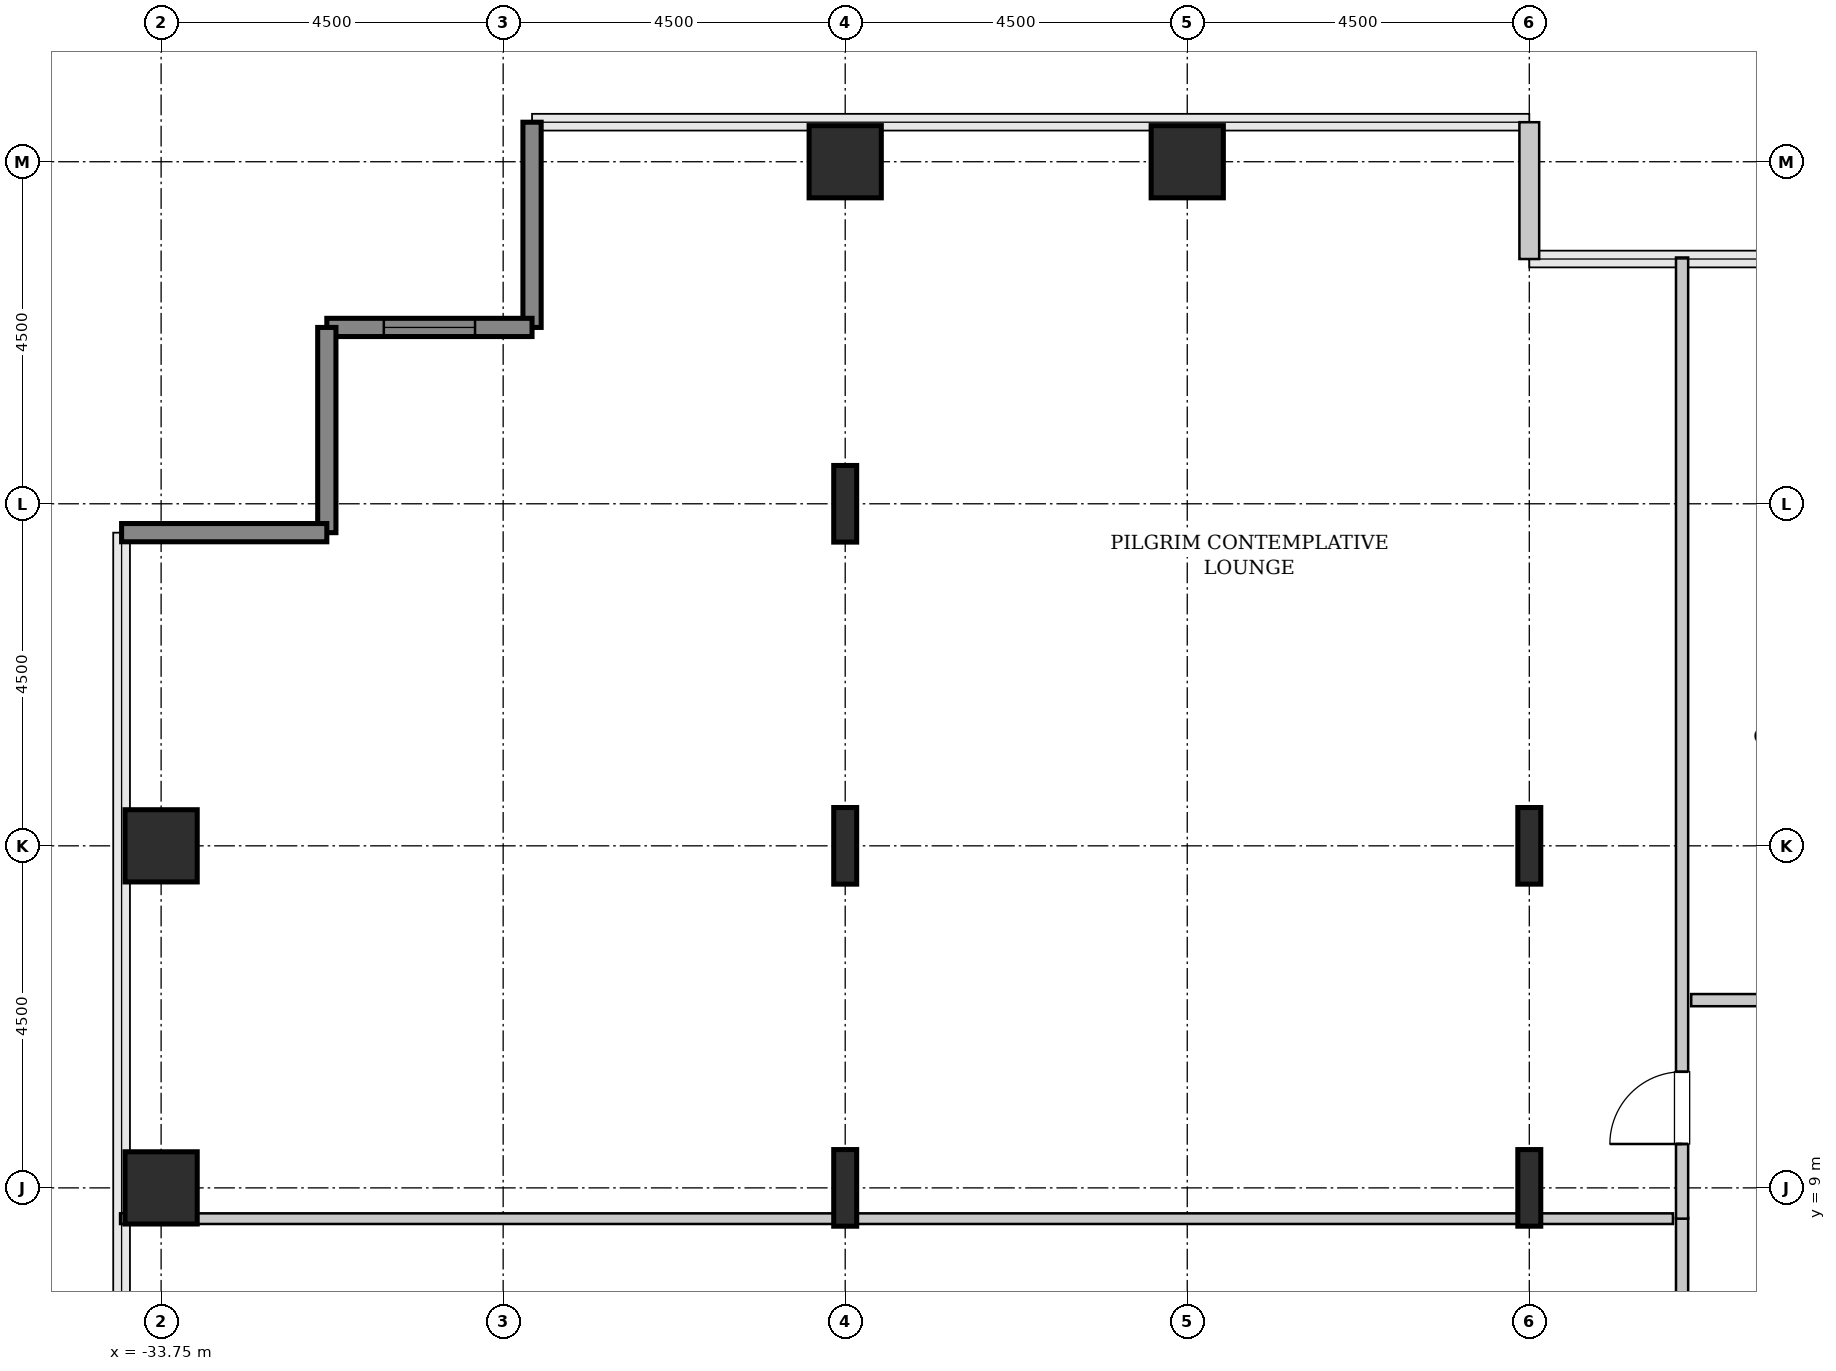
"""IFC4 building model, lengths in metres.
Left out: names, types, materials, properties, quantities, classifications, styles, units other than length and angle.
Written with IfcOpenShell. Run it as: python <this file> out.ifc"""

import sys

from ifc_helpers import new_model, si_unit, direction, frame, frame_2d, origin, origin_2d, place, context, subcontext, project, spatial, rectangle, hollow_rectangle, i_section, extrude, source, transform, mapped, element, fill, save


model = new_model("IFC4")
c1 = context("Model", 3, precision=1e-05, world=origin(), true_north=direction((0.0, 1.0)))
c2 = subcontext(c1, "Body", "Model", "MODEL_VIEW")
j1 = project(units=[si_unit("LENGTHUNIT", "METRE"), si_unit("PLANEANGLEUNIT", "RADIAN")], contexts=[c1])
p1 = place(None, origin())
s1 = spatial("IfcSite", under=j1, at=p1, CompositionType="ELEMENT")
p2 = place(p1, origin())
s2 = spatial("IfcBuilding", under=s1, at=p2, CompositionType="ELEMENT")
p3 = place(p2, frame((0.0, 0.0, 71.0)))
s3 = spatial("IfcBuildingStorey", under=s2, at=p3, CompositionType="ELEMENT", Elevation=71.0)
m1 = source(origin(), c2, "Body", "SweptSolid", [
    extrude(hollow_rectangle(XDim=0.95, YDim=0.95, WallThickness=0.045, InnerFilletRadius=0.045, OuterFilletRadius=0.09, at=origin_2d()), origin(), (0.0, 0.0, 1.0), 3.8),
])
for number, where, z_axis, x_axis in (
    (1, (-33.75, 9.0, 0.0), (0.0, 0.0, 1.0), (1.0, 0.0, 0.0)),
    (2, (-33.75, 13.5, 0.0), (0.0, 0.0, 1.0), (1.0, 0.0, 0.0)),
):
    element("IfcColumn", number, at=place(p3, frame(where, z_axis=z_axis, x_axis=x_axis)), inside=s3, PredefinedType="COLUMN", context=c2, shape_type="MappedRepresentation", body=[
        mapped(m1, transform((0.0, 0.0, 0.0), x_axis=(1.0, 0.0, 0.0), y_axis=(0.0, 1.0, 0.0), z_axis=(0.0, 0.0, 1.0), scale=1.0)),
    ])
m2 = source(origin(), c2, "Body", "SweptSolid", [
    extrude(i_section(OverallWidth=0.302, OverallDepth=1.008, WebThickness=0.021, FlangeThickness=0.04, FilletRadius=0.03, at=origin_2d()), origin(), (0.0, 0.0, 1.0), 3.8),
])
for number, where, z_axis, x_axis in (
    (3, (-24.75, 9.0, 0.0), (0.0, 0.0, 1.0), (1.0, 0.0, 0.0)),
    (4, (-24.75, 13.5, 0.0), (0.0, 0.0, 1.0), (1.0, 0.0, 0.0)),
    (5, (-24.75, 18.0, 0.0), (0.0, 0.0, 1.0), (1.0, 0.0, 0.0)),
):
    element("IfcColumn", number, at=place(p3, frame(where, z_axis=z_axis, x_axis=x_axis)), inside=s3, PredefinedType="COLUMN", context=c2, shape_type="MappedRepresentation", body=[
        mapped(m2, transform((0.0, 0.0, 0.0), x_axis=(1.0, 0.0, 0.0), y_axis=(0.0, 1.0, 0.0), z_axis=(0.0, 0.0, 1.0), scale=1.0)),
    ])
for number, where, z_axis, x_axis in (
    (6, (-24.75, 22.5, 0.0), (0.0, 0.0, 1.0), (1.0, 0.0, 0.0)),
    (7, (-20.25, 22.5, 0.0), (0.0, 0.0, 1.0), (1.0, 0.0, 0.0)),
):
    element("IfcColumn", number, at=place(p3, frame(where, z_axis=z_axis, x_axis=x_axis)), inside=s3, PredefinedType="COLUMN", context=c2, shape_type="MappedRepresentation", body=[
        mapped(m1, transform((0.0, 0.0, 0.0), x_axis=(1.0, 0.0, 0.0), y_axis=(0.0, 1.0, 0.0), z_axis=(0.0, 0.0, 1.0), scale=1.0)),
    ])
for number, where, z_axis, x_axis in (
    (8, (-15.75, 9.0, 0.0), (0.0, 0.0, 1.0), (1.0, 0.0, 0.0)),
    (9, (-15.75, 13.5, 0.0), (0.0, 0.0, 1.0), (1.0, 0.0, 0.0)),
):
    element("IfcColumn", number, at=place(p3, frame(where, z_axis=z_axis, x_axis=x_axis)), inside=s3, PredefinedType="COLUMN", context=c2, shape_type="MappedRepresentation", body=[
        mapped(m2, transform((0.0, 0.0, 0.0), x_axis=(1.0, 0.0, 0.0), y_axis=(0.0, 1.0, 0.0), z_axis=(0.0, 0.0, 1.0), scale=1.0)),
    ])
m3 = source(origin(), c2, "Body", "SweptSolid", [
    extrude(rectangle(XDim=1.8, YDim=0.26, at=frame_2d((0.9, 0.0))), origin(), (0.0, 0.0, 1.0), 3.55),
])
p4 = place(p3, frame((-15.75, 21.22, 0.0), z_axis=(0.0, 0.0, 1.0), x_axis=(0.0, 1.0, 0.0)))
e10 = element("IfcWall", 10, at=p4, inside=s3, PredefinedType="SOLIDWALL", context=c2, shape_type="MappedRepresentation", body=[
    mapped(m3, transform((0.0, 0.0, 0.0), x_axis=(1.0, 0.0, 0.0), y_axis=(0.0, 1.0, 0.0), z_axis=(0.0, 0.0, 1.0), scale=1.0)),
])
m4 = source(origin(), c2, "Body", "SweptSolid", [
    extrude(rectangle(XDim=2.7, YDim=0.24, at=frame_2d((1.35, 0.0))), origin(), (0.0, 0.0, 1.0), 3.55),
])
p5 = place(p3, frame((-28.87, 23.02, 0.0), z_axis=(0.0, 0.0, 1.0), x_axis=(0.0, -1.0, 0.0)))
e11 = element("IfcWall", 11, at=p5, inside=s3, PredefinedType="SHEAR", context=c2, shape_type="MappedRepresentation", body=[
    mapped(m4, transform((0.0, 0.0, 0.0), x_axis=(1.0, 0.0, 0.0), y_axis=(0.0, 1.0, 0.0), z_axis=(0.0, 0.0, 1.0), scale=1.0)),
])
p6 = place(p3, frame((-28.87, 20.32, 0.0), z_axis=(0.0, 0.0, 1.0), x_axis=(-1.0, 0.0, 0.0)))
e12 = element("IfcWall", 12, at=p6, inside=s3, PredefinedType="SHEAR", context=c2, shape_type="MappedRepresentation", body=[
    mapped(m4, transform((0.0, 0.0, 0.0), x_axis=(1.0, 0.0, 0.0), y_axis=(0.0, 1.0, 0.0), z_axis=(0.0, 0.0, 1.0), scale=1.0)),
])
p7 = place(p6, frame((0.75, 0.0, 0.85)))
e13 = element("IfcOpeningElement", 13, at=p7, cuts=e12, PredefinedType="OPENING", context=c2, shape_type="SweptSolid", body=[
    extrude(rectangle(XDim=1.2, YDim=1.8, at=frame_2d((0.6, 0.9))), frame((0.0, 0.13, 0.0), z_axis=(0.0, -1.0, 0.0), x_axis=(1.0, 0.0, 0.0)), (0.0, 0.0, 1.0), 0.26),
])
for number, where, z_axis, x_axis in (
    (14, (-31.57, 20.32, 0.0), (0.0, 0.0, 1.0), (0.0, -1.0, 0.0)),
    (15, (-31.57, 17.62, 0.0), (0.0, 0.0, 1.0), (-1.0, 0.0, 0.0)),
):
    element("IfcWall", number, at=place(p3, frame(where, z_axis=z_axis, x_axis=x_axis)), inside=s3, PredefinedType="SHEAR", context=c2, shape_type="MappedRepresentation", body=[
        mapped(m4, transform((0.0, 0.0, 0.0), x_axis=(1.0, 0.0, 0.0), y_axis=(0.0, 1.0, 0.0), z_axis=(0.0, 0.0, 1.0), scale=1.0)),
    ])
m5 = source(origin(), c2, "Body", "SweptSolid", [
    extrude(rectangle(XDim=3.21, YDim=0.16, at=frame_2d((1.605, 0.0))), origin(), (0.0, 0.0, 1.0), 3.535),
])
p8 = place(p3, frame((-13.74, 5.395, 0.0), z_axis=(0.0, 0.0, 1.0), x_axis=(0.0, 1.0, 0.0)))
e16 = element("IfcWall", 16, at=p8, inside=s3, PredefinedType="PARTITIONING", context=c2, shape_type="MappedRepresentation", body=[
    mapped(m5, transform((0.0, 0.0, 0.0), x_axis=(1.0, 0.0, 0.0), y_axis=(0.0, 1.0, 0.0), z_axis=(0.0, 0.0, 1.0), scale=1.0)),
])
p9 = place(p8, frame((1.13, 0.0, 0.0)))
e17 = element("IfcOpeningElement", 17, at=p9, cuts=e16, PredefinedType="OPENING", context=c2, shape_type="SweptSolid", body=[
    extrude(rectangle(XDim=0.95, YDim=2.1, at=frame_2d((0.475, 1.05))), frame((0.0, 0.09, 0.0), z_axis=(0.0, -1.0, 0.0), x_axis=(1.0, 0.0, 0.0)), (0.0, 0.0, 1.0), 0.18),
])
m6 = source(origin(), c2, "Body", "SweptSolid", [
    extrude(rectangle(XDim=20.43, YDim=0.14, at=frame_2d((10.215, 0.0))), origin(), (0.0, 0.0, 1.0), 2.825),
])
p10 = place(p3, frame((-34.29, 8.595, 0.0), z_axis=(0.0, 0.0, 1.0), x_axis=(1.0, 0.0, 0.0)))
e18 = element("IfcWall", 18, at=p10, inside=s3, PredefinedType="PARTITIONING", context=c2, shape_type="MappedRepresentation", body=[
    mapped(m6, transform((0.0, 0.0, 0.0), x_axis=(1.0, 0.0, 0.0), y_axis=(0.0, 1.0, 0.0), z_axis=(0.0, 0.0, 1.0), scale=1.0)),
])
m7 = source(origin(), c2, "Body", "SweptSolid", [
    extrude(rectangle(XDim=12.645, YDim=0.16, at=frame_2d((6.323, 0.0))), origin(), (0.0, 0.0, 1.0), 3.535),
])
p11 = place(p3, frame((-13.74, 8.595, 0.0), z_axis=(0.0, 0.0, 1.0), x_axis=(0.0, 1.0, 0.0)))
e19 = element("IfcWall", 19, at=p11, inside=s3, PredefinedType="PARTITIONING", context=c2, shape_type="MappedRepresentation", body=[
    mapped(m7, transform((0.0, 0.0, 0.0), x_axis=(1.0, 0.0, 0.0), y_axis=(0.0, 1.0, 0.0), z_axis=(0.0, 0.0, 1.0), scale=1.0)),
])
p12 = place(p11, frame((0.982, 0.0, 0.0)))
e20 = element("IfcOpeningElement", 20, at=p12, cuts=e19, PredefinedType="OPENING", context=c2, shape_type="SweptSolid", body=[
    extrude(rectangle(XDim=0.95, YDim=2.1, at=frame_2d((0.475, 1.05))), frame((0.0, 0.09, 0.0), z_axis=(0.0, -1.0, 0.0), x_axis=(1.0, 0.0, 0.0)), (0.0, 0.0, 1.0), 0.18),
])
m8 = source(origin(), c2, "Body", "SweptSolid", [
    extrude(rectangle(XDim=4.125, YDim=0.16, at=frame_2d((2.062, 0.0))), origin(), (0.0, 0.0, 1.0), 3.535),
])
p13 = place(p3, frame((-13.62, 11.47, 0.0), z_axis=(0.0, 0.0, 1.0), x_axis=(1.0, 0.0, 0.0)))
e21 = element("IfcWall", 21, at=p13, inside=s3, PredefinedType="PARTITIONING", context=c2, shape_type="MappedRepresentation", body=[
    mapped(m8, transform((0.0, 0.0, 0.0), x_axis=(1.0, 0.0, 0.0), y_axis=(0.0, 1.0, 0.0), z_axis=(0.0, 0.0, 1.0), scale=1.0)),
])
p14 = place(p13, frame((1.587, 0.0, 0.0)))
e22 = element("IfcOpeningElement", 22, at=p14, cuts=e21, PredefinedType="OPENING", context=c2, shape_type="SweptSolid", body=[
    extrude(rectangle(XDim=0.95, YDim=2.1, at=frame_2d((0.475, 1.05))), frame((0.0, 0.09, 0.0), z_axis=(0.0, -1.0, 0.0), x_axis=(1.0, 0.0, 0.0)), (0.0, 0.0, 1.0), 0.18),
])
m9 = source(origin(), c2, "Body", "SweptSolid", [
    extrude(rectangle(XDim=1.2, YDim=1.8, at=frame_2d((0.6, 0.9))), frame((0.0, 0.03, 0.0), z_axis=(0.0, -1.0, 0.0), x_axis=(1.0, 0.0, 0.0)), (0.0, 0.0, 1.0), 0.06),
])
p15 = place(p7, origin())
e23 = element("IfcWindow", 23, at=p15, inside=s3, PartitioningType="SINGLE_PANEL", PredefinedType="WINDOW", context=c2, shape_type="MappedRepresentation", body=[
    mapped(m9, transform((0.0, 0.0, 0.0), x_axis=(1.0, 0.0, 0.0), y_axis=(0.0, 1.0, 0.0), z_axis=(0.0, 0.0, 1.0), scale=1.0)),
])
fill(e13, e23)
m10 = source(origin(), c2, "Body", "SweptSolid", [
    extrude(rectangle(XDim=0.95, YDim=2.1, at=frame_2d((0.475, 1.05))), frame((0.0, 0.025, 0.0), z_axis=(0.0, -1.0, 0.0), x_axis=(1.0, 0.0, 0.0)), (0.0, 0.0, 1.0), 0.05),
])
p16 = place(p12, origin())
e24 = element("IfcDoor", 24, at=p16, inside=s3, OperationType="SINGLE_SWING_LEFT", PredefinedType="DOOR", context=c2, shape_type="MappedRepresentation", body=[
    mapped(m10, transform((0.0, 0.0, 0.0), x_axis=(1.0, 0.0, 0.0), y_axis=(0.0, 1.0, 0.0), z_axis=(0.0, 0.0, 1.0), scale=1.0)),
])
fill(e20, e24)
save(model, sys.argv[1])
